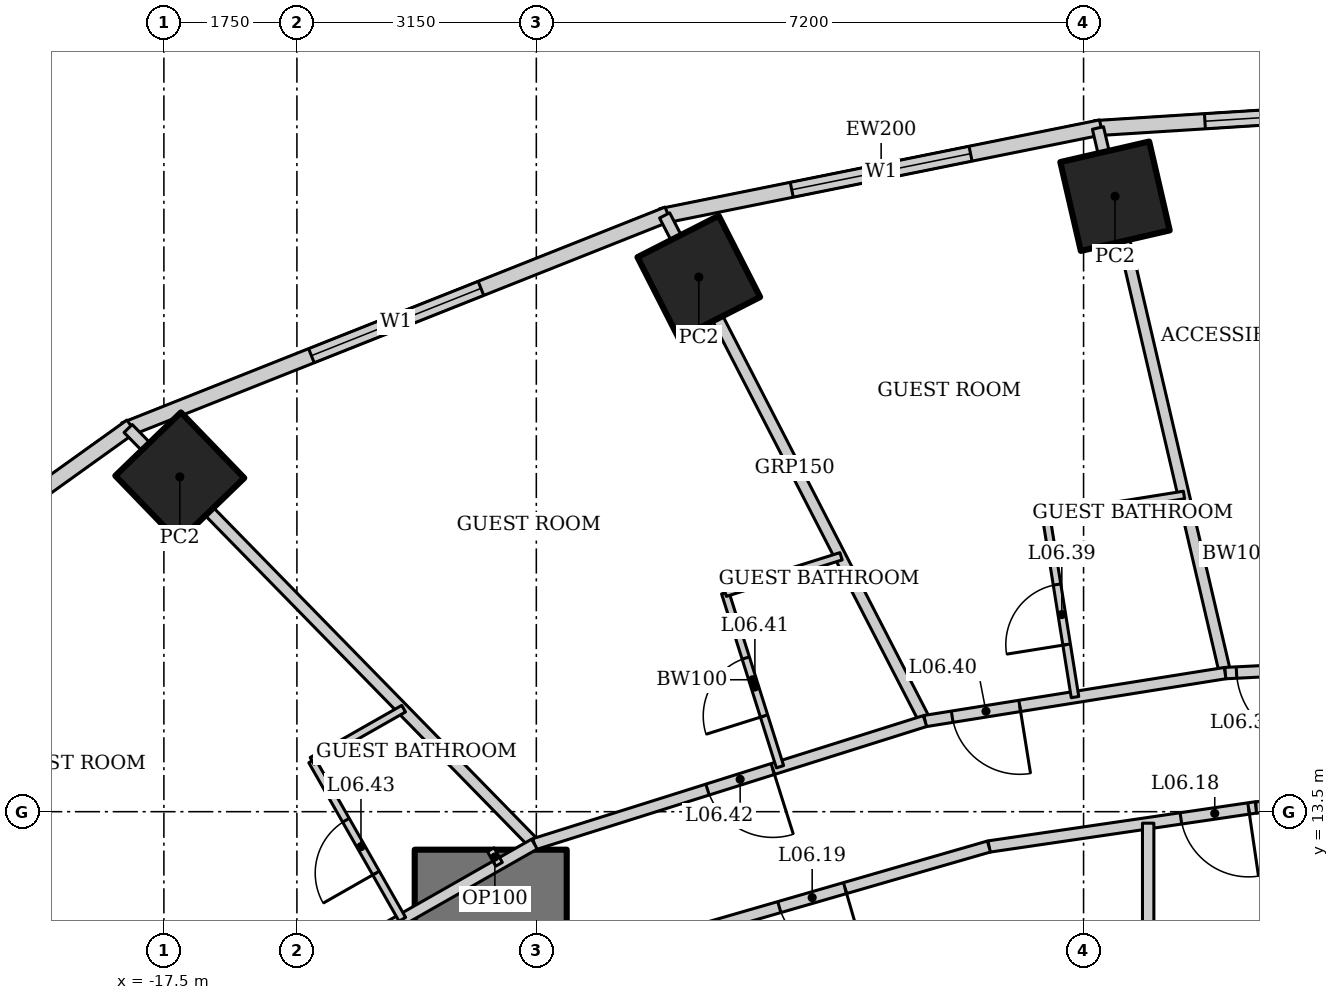
"""IFC4 building model, lengths in metres.
Left out: names, types, materials, properties, quantities, classifications, styles, units other than length and angle.
Written with IfcOpenShell. Run it as: python <this file> out.ifc"""

import sys

from ifc_helpers import new_model, si_unit, direction, frame, frame_2d, origin, origin_2d, place, context, subcontext, project, spatial, rectangle, hollow_rectangle, extrude, element, fill, save


model = new_model("IFC4")
c1 = context("Model", 3, precision=1e-05, world=origin(), true_north=direction((0.0, 1.0)))
c2 = subcontext(c1, "Body", "Model", "MODEL_VIEW")
j1 = project(units=[si_unit("LENGTHUNIT", "METRE"), si_unit("PLANEANGLEUNIT", "RADIAN")], contexts=[c1])
p1 = place(None, origin())
s1 = spatial("IfcSite", under=j1, at=p1, CompositionType="ELEMENT")
p2 = place(p1, origin())
s2 = spatial("IfcBuilding", under=s1, at=p2, CompositionType="ELEMENT")
p3 = place(p2, frame((0.0, 0.0, 37.0)))
s3 = spatial("IfcBuildingStorey", under=s2, at=p3, CompositionType="ELEMENT", Elevation=37.0)
for number, where, z_axis, x_axis in (
    (1, (-4.986, 21.598, 0.0), (0.0, 0.0, 1.0), (0.974, 0.225, 0.0)),
    (2, (-10.463, 20.534, 0.0), (0.0, 0.0, 1.0), (0.891, 0.454, 0.0)),
    (3, (-17.291, 17.905, 0.0), (0.0, 0.0, 1.0), (0.719, 0.695, 0.0)),
):
    element("IfcColumn", number, at=place(p3, frame(where, z_axis=z_axis, x_axis=x_axis)), inside=s3, PredefinedType="COLUMN", context=c2, shape_type="SweptSolid", body=[
        extrude(hollow_rectangle(XDim=1.2, YDim=1.2, WallThickness=0.1, at=origin_2d()), origin(), (0.0, 0.0, 1.0), 3.6),
    ])
p4 = place(p3, frame((-13.2, 13.0, 0.0), z_axis=(0.0, 0.0, 1.0), x_axis=(0.0, -1.0, 0.0)))
e4 = element("IfcWall", 4, at=p4, inside=s3, PredefinedType="SHEAR", context=c2, shape_type="SweptSolid", body=[
    extrude(rectangle(XDim=26.0, YDim=2.0, at=frame_2d((13.0, 0.0))), origin(), (0.0, 0.0, 1.0), 3.6),
])
p5 = place(p4, frame((12.1, 0.0, 0.0)))
e5 = element("IfcOpeningElement", 5, at=p5, cuts=e4, PredefinedType="OPENING", context=c2, shape_type="SweptSolid", body=[
    extrude(rectangle(XDim=1.8, YDim=2.1, at=frame_2d((0.9, 1.05))), frame((0.0, 1.01, 0.0), z_axis=(0.0, -1.0, 0.0), x_axis=(1.0, 0.0, 0.0)), (0.0, 0.0, 1.0), 2.02),
])
p6 = place(p3, frame((0.041, 22.827, 0.0), z_axis=(0.0, 0.0, 1.0), x_axis=(-0.998018582375, -0.062919863585, 0.0)))
e6 = element("IfcWall", 6, at=p6, inside=s3, PredefinedType="SOLIDWALL", context=c2, shape_type="SweptSolid", body=[
    extrude(rectangle(XDim=5.304, YDim=0.2, at=frame_2d((2.652, 0.0))), origin(), (0.0, 0.0, 1.0), 3.45),
])
p7 = place(p6, frame((1.452, 0.0, 0.5)))
e7 = element("IfcOpeningElement", 7, at=p7, cuts=e6, PredefinedType="OPENING", context=c2, shape_type="SweptSolid", body=[
    extrude(rectangle(XDim=2.4, YDim=2.2, at=frame_2d((1.2, 1.1))), frame((0.0, 0.11, 0.0), z_axis=(0.0, -1.0, 0.0), x_axis=(1.0, 0.0, 0.0)), (0.0, 0.0, 1.0), 0.22),
])
p8 = place(p3, frame((-5.17, 22.504, 0.0), z_axis=(0.0, 0.0, 1.0), x_axis=(-0.980251657452, -0.197754110105, 0.0)))
e8 = element("IfcWall", 8, at=p8, inside=s3, PredefinedType="SOLIDWALL", context=c2, shape_type="SweptSolid", body=[
    extrude(rectangle(XDim=5.904, YDim=0.2, at=frame_2d((2.952, 0.0))), origin(), (0.0, 0.0, 1.0), 3.45),
])
p9 = place(p8, frame((1.752, 0.0, 0.5)))
e9 = element("IfcOpeningElement", 9, at=p9, cuts=e8, PredefinedType="OPENING", context=c2, shape_type="SweptSolid", body=[
    extrude(rectangle(XDim=2.4, YDim=2.2, at=frame_2d((1.2, 1.1))), frame((0.0, 0.11, 0.0), z_axis=(0.0, -1.0, 0.0), x_axis=(1.0, 0.0, 0.0)), (0.0, 0.0, 1.0), 0.22),
])
p10 = place(p3, frame((-10.869, 21.363, 0.0), z_axis=(0.0, 0.0, 1.0), x_axis=(-0.929358351251, -0.369178892895, 0.0)))
e10 = element("IfcWall", 10, at=p10, inside=s3, PredefinedType="SOLIDWALL", context=c2, shape_type="SweptSolid", body=[
    extrude(rectangle(XDim=7.692, YDim=0.2, at=frame_2d((3.846, 0.0))), origin(), (0.0, 0.0, 1.0), 3.45),
])
p11 = place(p10, frame((2.646, 0.0, 0.5)))
e11 = element("IfcOpeningElement", 11, at=p11, cuts=e10, PredefinedType="OPENING", context=c2, shape_type="SweptSolid", body=[
    extrude(rectangle(XDim=2.4, YDim=2.2, at=frame_2d((1.2, 1.1))), frame((0.0, 0.11, 0.0), z_axis=(0.0, -1.0, 0.0), x_axis=(1.0, 0.0, 0.0)), (0.0, 0.0, 1.0), 0.22),
])
p12 = place(p3, frame((-17.929, 18.572, 0.0), z_axis=(0.0, 0.0, 1.0), x_axis=(-0.812791321576, -0.582554948112, 0.0)))
e12 = element("IfcWall", 12, at=p12, inside=s3, PredefinedType="SOLIDWALL", context=c2, shape_type="SweptSolid", body=[
    extrude(rectangle(XDim=8.063, YDim=0.2, at=frame_2d((4.032, 0.0))), origin(), (0.0, 0.0, 1.0), 3.45),
])
p13 = place(p12, frame((2.832, 0.0, 0.5)))
e13 = element("IfcOpeningElement", 13, at=p13, cuts=e12, PredefinedType="OPENING", context=c2, shape_type="SweptSolid", body=[
    extrude(rectangle(XDim=2.4, YDim=2.2, at=frame_2d((1.2, 1.1))), frame((0.0, 0.11, 0.0), z_axis=(0.0, -1.0, 0.0), x_axis=(1.0, 0.0, 0.0)), (0.0, 0.0, 1.0), 0.22),
])
p14 = place(p3, frame((-5.211, 22.496, 0.0), z_axis=(0.0, 0.0, 1.0), x_axis=(0.227195035564, -0.973849277771, 0.0)))
e14 = element("IfcWall", 14, at=p14, inside=s3, PredefinedType="PARTITIONING", context=c2, shape_type="SweptSolid", body=[
    extrude(rectangle(XDim=7.365, YDim=0.15, at=frame_2d((3.683, 0.0))), origin(), (0.0, 0.0, 1.0), 2.767),
])
p15 = place(p3, frame((-10.912, 21.346, 0.0), z_axis=(0.0, 0.0, 1.0), x_axis=(0.45777845119, -0.889066302154, 0.0)))
e15 = element("IfcWall", 15, at=p15, inside=s3, PredefinedType="PARTITIONING", context=c2, shape_type="SweptSolid", body=[
    extrude(rectangle(XDim=7.483, YDim=0.15, at=frame_2d((3.742, 0.0))), origin(), (0.0, 0.0, 1.0), 2.528),
])
p16 = place(p3, frame((-17.97, 18.542, 0.0), z_axis=(0.0, 0.0, 1.0), x_axis=(0.699032031211, -0.715090357467, 0.0)))
e16 = element("IfcWall", 16, at=p16, inside=s3, PredefinedType="PARTITIONING", context=c2, shape_type="SweptSolid", body=[
    extrude(rectangle(XDim=7.647, YDim=0.15, at=frame_2d((3.824, 0.0))), origin(), (0.0, 0.0, 1.0), 2.528),
])
p17 = place(p3, frame((-24.435, 13.909, 0.0), z_axis=(0.0, 0.0, 1.0), x_axis=(0.871267209855, -0.490808974074, 0.0)))
e17 = element("IfcWall", 17, at=p17, inside=s3, PredefinedType="PARTITIONING", context=c2, shape_type="SweptSolid", body=[
    extrude(rectangle(XDim=7.659, YDim=0.15, at=frame_2d((3.83, 0.0))), origin(), (0.0, 0.0, 1.0), 2.693),
])
p18 = place(p3, frame((0.0, 15.5, 0.0), z_axis=(0.0, 0.0, 1.0), x_axis=(-0.998754057167, -0.049903239295, 0.0)))
e18 = element("IfcWall", 18, at=p18, inside=s3, PredefinedType="PARTITIONING", context=c2, shape_type="SweptSolid", body=[
    extrude(rectangle(XDim=3.542, YDim=0.15, at=frame_2d((1.771, 0.0))), origin(), (0.0, 0.0, 1.0), 3.45),
])
p19 = place(p18, frame((2.392, 0.0, 0.0)))
e19 = element("IfcOpeningElement", 19, at=p19, cuts=e18, PredefinedType="OPENING", context=c2, shape_type="SweptSolid", body=[
    extrude(rectangle(XDim=1.0, YDim=2.1, at=frame_2d((0.5, 1.05))), frame((0.0, 0.085, 0.0), z_axis=(0.0, -1.0, 0.0), x_axis=(1.0, 0.0, 0.0)), (0.0, 0.0, 1.0), 0.17),
])
p20 = place(p3, frame((-3.538, 15.323, 0.0), z_axis=(0.0, 0.0, 1.0), x_axis=(-0.987475660646, -0.157771415761, 0.0)))
e20 = element("IfcWall", 20, at=p20, inside=s3, PredefinedType="PARTITIONING", context=c2, shape_type="SweptSolid", body=[
    extrude(rectangle(XDim=3.999, YDim=0.15, at=frame_2d((1.999, 0.0))), origin(), (0.0, 0.0, 1.0), 3.45),
])
p21 = place(p20, frame((2.736, 0.0, 0.0)))
e21 = element("IfcOpeningElement", 21, at=p21, cuts=e20, PredefinedType="OPENING", context=c2, shape_type="SweptSolid", body=[
    extrude(rectangle(XDim=0.9, YDim=2.1, at=frame_2d((0.45, 1.05))), frame((0.0, 0.085, 0.0), z_axis=(0.0, -1.0, 0.0), x_axis=(1.0, 0.0, 0.0)), (0.0, 0.0, 1.0), 0.17),
])
p22 = place(p3, frame((-7.486, 14.692, 0.0), z_axis=(0.0, 0.0, 1.0), x_axis=(-0.953774229808, -0.30052407317, 0.0)))
e22 = element("IfcWall", 22, at=p22, inside=s3, PredefinedType="PARTITIONING", context=c2, shape_type="SweptSolid", body=[
    extrude(rectangle(XDim=5.388, YDim=0.15, at=frame_2d((2.694, 0.0))), origin(), (0.0, 0.0, 1.0), 3.45),
])
p23 = place(p22, frame((2.1, 0.0, 0.0)))
e23 = element("IfcOpeningElement", 23, at=p23, cuts=e22, PredefinedType="OPENING", context=c2, shape_type="SweptSolid", body=[
    extrude(rectangle(XDim=0.9, YDim=2.1, at=frame_2d((0.45, 1.05))), frame((0.0, 0.085, 0.0), z_axis=(0.0, -1.0, 0.0), x_axis=(1.0, 0.0, 0.0)), (0.0, 0.0, 1.0), 0.17),
])
p24 = place(p3, frame((-12.625, 13.073, 0.0), z_axis=(0.0, 0.0, 1.0), x_axis=(-0.86907565943, -0.494679187136, 0.0)))
e24 = element("IfcWall", 24, at=p24, inside=s3, PredefinedType="PARTITIONING", context=c2, shape_type="SweptSolid", body=[
    extrude(rectangle(XDim=5.911, YDim=0.15, at=frame_2d((2.955, 0.0))), origin(), (0.0, 0.0, 1.0), 3.45),
])
p25 = place(p24, frame((2.437, 0.0, 0.0)))
e25 = element("IfcOpeningElement", 25, at=p25, cuts=e24, PredefinedType="OPENING", context=c2, shape_type="SweptSolid", body=[
    extrude(rectangle(XDim=0.9, YDim=2.1, at=frame_2d((0.45, 1.05))), frame((0.0, 0.085, 0.0), z_axis=(0.0, -1.0, 0.0), x_axis=(1.0, 0.0, 0.0)), (0.0, 0.0, 1.0), 0.17),
])
p26 = place(p3, frame((-3.13, 13.557, 0.0), z_axis=(0.0, 0.0, 1.0), x_axis=(-0.989443047021, -0.14492224364, 0.0)))
e26 = element("IfcWall", 26, at=p26, inside=s3, PredefinedType="PARTITIONING", context=c2, shape_type="SweptSolid", body=[
    extrude(rectangle(XDim=3.553, YDim=0.15, at=frame_2d((1.776, 0.0))), origin(), (0.0, 0.0, 1.0), 3.45),
])
p27 = place(p26, frame((0.1, 0.0, 0.0)))
e27 = element("IfcOpeningElement", 27, at=p27, cuts=e26, PredefinedType="OPENING", context=c2, shape_type="SweptSolid", body=[
    extrude(rectangle(XDim=0.9, YDim=2.1, at=frame_2d((0.45, 1.05))), frame((0.0, 0.085, 0.0), z_axis=(0.0, -1.0, 0.0), x_axis=(1.0, 0.0, 0.0)), (0.0, 0.0, 1.0), 0.17),
])
p28 = place(p3, frame((-6.645, 13.042, 0.0), z_axis=(0.0, 0.0, 1.0), x_axis=(-0.960678318068, -0.277663770041, 0.0)))
e28 = element("IfcWall", 28, at=p28, inside=s3, PredefinedType="PARTITIONING", context=c2, shape_type="SweptSolid", body=[
    extrude(rectangle(XDim=4.841, YDim=0.15, at=frame_2d((2.421, 0.0))), origin(), (0.0, 0.0, 1.0), 3.45),
])
p29 = place(p28, frame((1.971, 0.0, 0.0)))
e29 = element("IfcOpeningElement", 29, at=p29, cuts=e28, PredefinedType="OPENING", context=c2, shape_type="SweptSolid", body=[
    extrude(rectangle(XDim=0.9, YDim=2.1, at=frame_2d((0.45, 1.05))), frame((0.0, 0.085, 0.0), z_axis=(0.0, -1.0, 0.0), x_axis=(1.0, 0.0, 0.0)), (0.0, 0.0, 1.0), 0.17),
])
p30 = place(p3, frame((-4.55, 9.2, 0.0), z_axis=(0.0, 0.0, 1.0), x_axis=(0.0, 1.0, 0.0)))
e30 = element("IfcWall", 30, at=p30, inside=s3, PredefinedType="SOLIDWALL", context=c2, shape_type="SweptSolid", body=[
    extrude(rectangle(XDim=4.149, YDim=0.15, at=frame_2d((2.074, 0.0))), origin(), (0.0, 0.0, 1.0), 3.45),
])
p31 = place(p3, frame((-5.513, 15.008, 0.0), z_axis=(0.0, 0.0, 1.0), x_axis=(-0.157780217218, 0.987474254376, 0.0)))
e31 = element("IfcWall", 31, at=p31, inside=s3, PredefinedType="PARTITIONING", context=c2, shape_type="SweptSolid", body=[
    extrude(rectangle(XDim=2.4, YDim=0.1, at=frame_2d((1.2, 0.0))), origin(), (0.0, 0.0, 1.0), 3.45),
])
p32 = place(p31, frame((0.7, 0.0, 0.0)))
e32 = element("IfcOpeningElement", 32, at=p32, cuts=e31, PredefinedType="OPENING", context=c2, shape_type="SweptSolid", body=[
    extrude(rectangle(XDim=0.8, YDim=2.1, at=frame_2d((0.4, 1.05))), frame((0.0, 0.06, 0.0), z_axis=(0.0, -1.0, 0.0), x_axis=(1.0, 0.0, 0.0)), (0.0, 0.0, 1.0), 0.12),
])
p33 = place(p3, frame((-5.891, 17.378, 0.0), z_axis=(0.0, 0.0, 1.0), x_axis=(0.987478784284, 0.157751863976, 0.0)))
e33 = element("IfcWall", 33, at=p33, inside=s3, PredefinedType="PARTITIONING", context=c2, shape_type="SweptSolid", body=[
    extrude(rectangle(XDim=1.835, YDim=0.1, at=frame_2d((0.918, 0.0))), origin(), (0.0, 0.0, 1.0), 3.45),
])
p34 = place(p3, frame((-9.394, 14.091, 0.0), z_axis=(0.0, 0.0, 1.0), x_axis=(-0.30049839721, 0.953782319649, 0.0)))
e34 = element("IfcWall", 34, at=p34, inside=s3, PredefinedType="PARTITIONING", context=c2, shape_type="SweptSolid", body=[
    extrude(rectangle(XDim=2.4, YDim=0.1, at=frame_2d((1.2, 0.0))), origin(), (0.0, 0.0, 1.0), 3.45),
])
p35 = place(p34, frame((0.7, 0.0, 0.0)))
e35 = element("IfcOpeningElement", 35, at=p35, cuts=e34, PredefinedType="OPENING", context=c2, shape_type="SweptSolid", body=[
    extrude(rectangle(XDim=0.8, YDim=2.1, at=frame_2d((0.4, 1.05))), frame((0.0, 0.06, 0.0), z_axis=(0.0, -1.0, 0.0), x_axis=(1.0, 0.0, 0.0)), (0.0, 0.0, 1.0), 0.12),
])
p36 = place(p3, frame((-10.115, 16.38, 0.0), z_axis=(0.0, 0.0, 1.0), x_axis=(0.953764923986, 0.300553605492, 0.0)))
e36 = element("IfcWall", 36, at=p36, inside=s3, PredefinedType="PARTITIONING", context=c2, shape_type="SweptSolid", body=[
    extrude(rectangle(XDim=1.598, YDim=0.1, at=frame_2d((0.799, 0.0))), origin(), (0.0, 0.0, 1.0), 3.45),
])
p37 = place(p3, frame((-14.363, 12.084, 0.0), z_axis=(0.0, 0.0, 1.0), x_axis=(-0.494703113698, 0.869062039959, 0.0)))
e37 = element("IfcWall", 37, at=p37, inside=s3, PredefinedType="PARTITIONING", context=c2, shape_type="SweptSolid", body=[
    extrude(rectangle(XDim=2.4, YDim=0.1, at=frame_2d((1.2, 0.0))), origin(), (0.0, 0.0, 1.0), 3.45),
])
p38 = place(p37, frame((0.7, 0.0, 0.0)))
e38 = element("IfcOpeningElement", 38, at=p38, cuts=e37, PredefinedType="OPENING", context=c2, shape_type="SweptSolid", body=[
    extrude(rectangle(XDim=0.8, YDim=2.1, at=frame_2d((0.4, 1.05))), frame((0.0, 0.06, 0.0), z_axis=(0.0, -1.0, 0.0), x_axis=(1.0, 0.0, 0.0)), (0.0, 0.0, 1.0), 0.12),
])
p39 = place(p3, frame((-15.55, 14.17, 0.0), z_axis=(0.0, 0.0, 1.0), x_axis=(0.869065896633, 0.494696338485, 0.0)))
e39 = element("IfcWall", 39, at=p39, inside=s3, PredefinedType="PARTITIONING", context=c2, shape_type="SweptSolid", body=[
    extrude(rectangle(XDim=1.386, YDim=0.1, at=frame_2d((0.693, 0.0))), origin(), (0.0, 0.0, 1.0), 3.45),
])
p40 = place(p3, frame((-13.2, 13.0, 0.0), z_axis=(0.0, 0.0, 1.0), x_axis=(0.49435138335, -0.869262164011, 0.0)))
e40 = element("IfcWall", 40, at=p40, inside=s3, PredefinedType="PARTITIONING", context=c2, shape_type="SweptSolid", body=[
    extrude(rectangle(XDim=0.221, YDim=0.1, at=frame_2d((0.11, 0.0))), origin(), (0.0, 0.0, 1.0), 3.45),
])
p41 = place(p3, frame((-2.66, 13.578, 0.0), z_axis=(0.0, 0.0, 1.0), x_axis=(-0.998932929821, -0.046184431561, 0.0)))
e41 = element("IfcWall", 41, at=p41, inside=s3, PredefinedType="PARTITIONING", context=c2, shape_type="SweptSolid", body=[
    extrude(rectangle(XDim=0.47, YDim=0.15, at=frame_2d((0.235, 0.0))), origin(), (0.0, 0.0, 1.0), 3.45),
])
p42 = place(p7, origin())
e42 = element("IfcWindow", 42, at=p42, inside=s3, PartitioningType="SINGLE_PANEL", PredefinedType="WINDOW", context=c2, shape_type="SweptSolid", body=[
    extrude(rectangle(XDim=2.4, YDim=2.2, at=frame_2d((1.2, 1.1))), frame((0.0, 0.03, 0.0), z_axis=(0.0, -1.0, 0.0), x_axis=(1.0, 0.0, 0.0)), (0.0, 0.0, 1.0), 0.06),
])
fill(e7, e42)
p43 = place(p9, origin())
e43 = element("IfcWindow", 43, at=p43, inside=s3, PartitioningType="SINGLE_PANEL", PredefinedType="WINDOW", context=c2, shape_type="SweptSolid", body=[
    extrude(rectangle(XDim=2.4, YDim=2.2, at=frame_2d((1.2, 1.1))), frame((0.0, 0.03, 0.0), z_axis=(0.0, -1.0, 0.0), x_axis=(1.0, 0.0, 0.0)), (0.0, 0.0, 1.0), 0.06),
])
fill(e9, e43)
p44 = place(p11, origin())
e44 = element("IfcWindow", 44, at=p44, inside=s3, PartitioningType="SINGLE_PANEL", PredefinedType="WINDOW", context=c2, shape_type="SweptSolid", body=[
    extrude(rectangle(XDim=2.4, YDim=2.2, at=frame_2d((1.2, 1.1))), frame((0.0, 0.03, 0.0), z_axis=(0.0, -1.0, 0.0), x_axis=(1.0, 0.0, 0.0)), (0.0, 0.0, 1.0), 0.06),
])
fill(e11, e44)
p45 = place(p27, origin())
e45 = element("IfcDoor", 45, at=p45, inside=s3, OperationType="SINGLE_SWING_LEFT", PredefinedType="DOOR", context=c2, shape_type="SweptSolid", body=[
    extrude(rectangle(XDim=0.9, YDim=2.1, at=frame_2d((0.45, 1.05))), frame((0.0, 0.025, 0.0), z_axis=(0.0, -1.0, 0.0), x_axis=(1.0, 0.0, 0.0)), (0.0, 0.0, 1.0), 0.05),
])
fill(e27, e45)
p46 = place(p29, origin())
e46 = element("IfcDoor", 46, at=p46, inside=s3, OperationType="SINGLE_SWING_LEFT", PredefinedType="DOOR", context=c2, shape_type="SweptSolid", body=[
    extrude(rectangle(XDim=0.9, YDim=2.1, at=frame_2d((0.45, 1.05))), frame((0.0, 0.025, 0.0), z_axis=(0.0, -1.0, 0.0), x_axis=(1.0, 0.0, 0.0)), (0.0, 0.0, 1.0), 0.05),
])
fill(e29, e46)
p47 = place(p19, origin())
e47 = element("IfcDoor", 47, at=p47, inside=s3, OperationType="SINGLE_SWING_LEFT", PredefinedType="DOOR", context=c2, shape_type="SweptSolid", body=[
    extrude(rectangle(XDim=1.0, YDim=2.1, at=frame_2d((0.5, 1.05))), frame((0.0, 0.025, 0.0), z_axis=(0.0, -1.0, 0.0), x_axis=(1.0, 0.0, 0.0)), (0.0, 0.0, 1.0), 0.05),
])
fill(e19, e47)
p48 = place(p32, origin())
e48 = element("IfcDoor", 48, at=p48, inside=s3, OperationType="SINGLE_SWING_LEFT", PredefinedType="DOOR", context=c2, shape_type="SweptSolid", body=[
    extrude(rectangle(XDim=0.8, YDim=2.1, at=frame_2d((0.4, 1.05))), frame((0.0, 0.025, 0.0), z_axis=(0.0, -1.0, 0.0), x_axis=(1.0, 0.0, 0.0)), (0.0, 0.0, 1.0), 0.05),
])
fill(e32, e48)
p49 = place(p21, origin())
e49 = element("IfcDoor", 49, at=p49, inside=s3, OperationType="SINGLE_SWING_LEFT", PredefinedType="DOOR", context=c2, shape_type="SweptSolid", body=[
    extrude(rectangle(XDim=0.9, YDim=2.1, at=frame_2d((0.45, 1.05))), frame((0.0, 0.025, 0.0), z_axis=(0.0, -1.0, 0.0), x_axis=(1.0, 0.0, 0.0)), (0.0, 0.0, 1.0), 0.05),
])
fill(e21, e49)
p50 = place(p35, origin())
e50 = element("IfcDoor", 50, at=p50, inside=s3, OperationType="SINGLE_SWING_LEFT", PredefinedType="DOOR", context=c2, shape_type="SweptSolid", body=[
    extrude(rectangle(XDim=0.8, YDim=2.1, at=frame_2d((0.4, 1.05))), frame((0.0, 0.025, 0.0), z_axis=(0.0, -1.0, 0.0), x_axis=(1.0, 0.0, 0.0)), (0.0, 0.0, 1.0), 0.05),
])
fill(e35, e50)
p51 = place(p23, origin())
e51 = element("IfcDoor", 51, at=p51, inside=s3, OperationType="SINGLE_SWING_LEFT", PredefinedType="DOOR", context=c2, shape_type="SweptSolid", body=[
    extrude(rectangle(XDim=0.9, YDim=2.1, at=frame_2d((0.45, 1.05))), frame((0.0, 0.025, 0.0), z_axis=(0.0, -1.0, 0.0), x_axis=(1.0, 0.0, 0.0)), (0.0, 0.0, 1.0), 0.05),
])
fill(e23, e51)
p52 = place(p38, origin())
e52 = element("IfcDoor", 52, at=p52, inside=s3, OperationType="SINGLE_SWING_LEFT", PredefinedType="DOOR", context=c2, shape_type="SweptSolid", body=[
    extrude(rectangle(XDim=0.8, YDim=2.1, at=frame_2d((0.4, 1.05))), frame((0.0, 0.025, 0.0), z_axis=(0.0, -1.0, 0.0), x_axis=(1.0, 0.0, 0.0)), (0.0, 0.0, 1.0), 0.05),
])
fill(e38, e52)
save(model, sys.argv[1])
